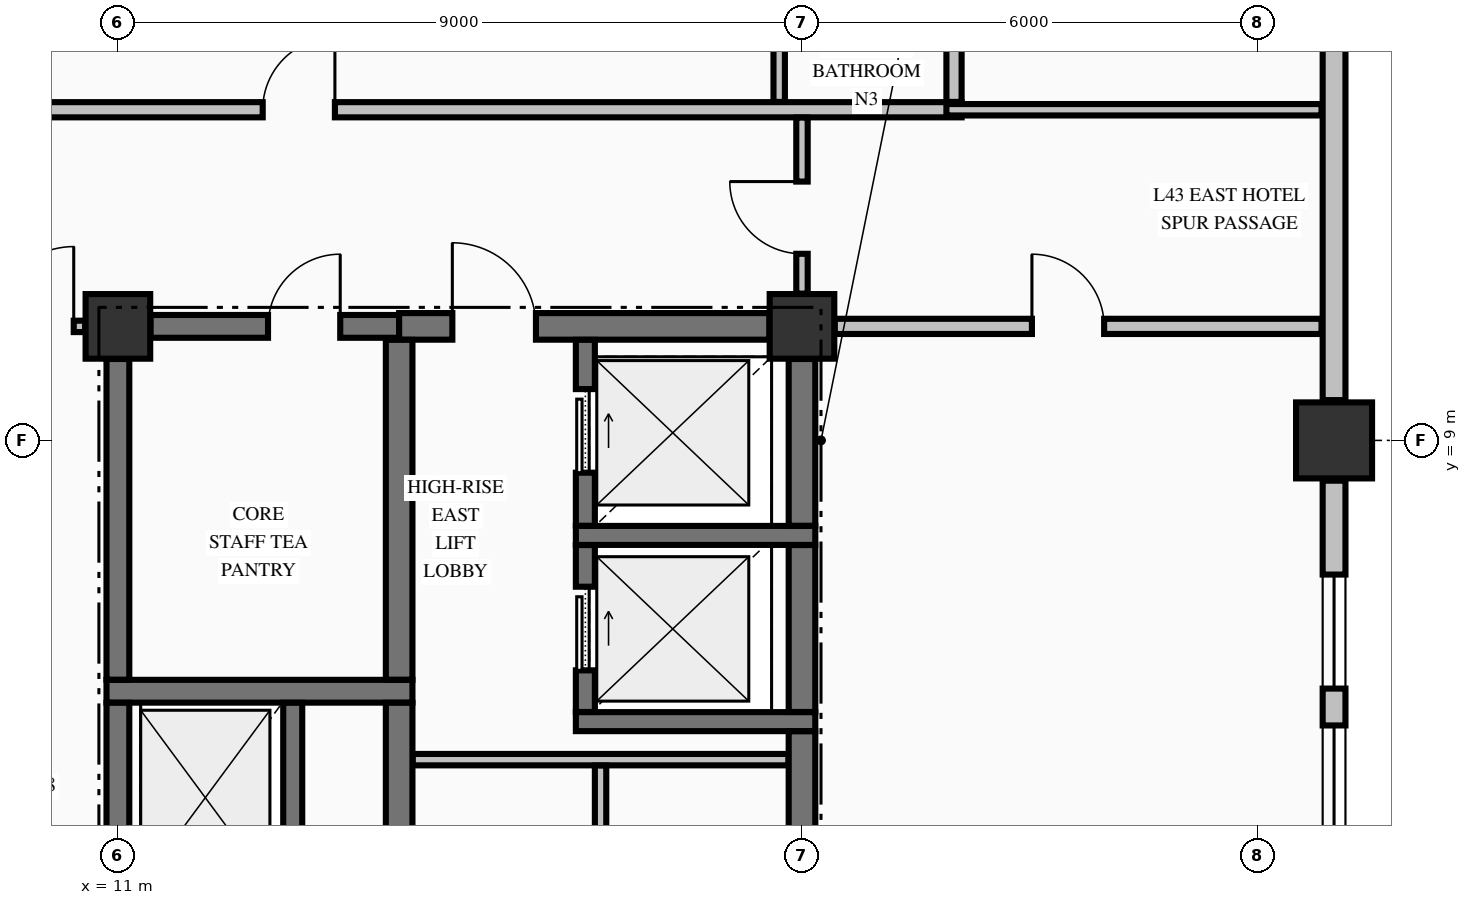
"""IFC4 building model, lengths in metres.
Left out: names, types, materials, properties, quantities, classifications, styles, units other than length and angle.
Written with IfcOpenShell. Run it as: python <this file> out.ifc"""

import sys

from ifc_helpers import new_model, si_unit, direction, frame, frame_2d, origin, origin_2d, place, context, subcontext, project, spatial, rectangle, extrude, element, fill, save


model = new_model("IFC4")
c1 = context("Model", 3, precision=1e-05, world=origin(), true_north=direction((0.0, 1.0)))
c2 = subcontext(c1, "Body", "Model", "MODEL_VIEW")
j1 = project(units=[si_unit("LENGTHUNIT", "METRE"), si_unit("PLANEANGLEUNIT", "RADIAN")], contexts=[c1])
p1 = place(None, origin())
s1 = spatial("IfcSite", under=j1, at=p1, CompositionType="ELEMENT")
p2 = place(p1, origin())
s2 = spatial("IfcBuilding", under=s1, at=p2, CompositionType="ELEMENT")
p3 = place(p2, frame((0.0, 0.0, 169.46)))
s3 = spatial("IfcBuildingStorey", under=s2, at=p3, CompositionType="ELEMENT", Elevation=169.46)
p4 = place(p3, frame((27.0, 9.0, -0.25), z_axis=(0.0, 0.0, 1.0), x_axis=(1.0, 0.0, 0.0)))
e1 = element("IfcColumn", 1, at=p4, inside=s3, PredefinedType="COLUMN", context=c2, shape_type="SweptSolid", body=[
    extrude(rectangle(XDim=1.0, YDim=1.0, at=origin_2d()), origin(), (0.0, 0.0, 1.0), 3.4),
])
for number, where, z_axis, x_axis in (
    (2, (11.0, 10.5, -0.25), (0.0, 0.0, 1.0), (1.0, 0.0, 0.0)),
    (3, (20.0, 10.5, -0.25), (0.0, 0.0, 1.0), (1.0, 0.0, 0.0)),
):
    element("IfcColumn", number, at=place(p3, frame(where, z_axis=z_axis, x_axis=x_axis)), inside=s3, PredefinedType="COLUMN", context=c2, shape_type="SweptSolid", body=[
        extrude(rectangle(XDim=0.85, YDim=0.85, at=origin_2d()), origin(), (0.0, 0.0, 1.0), 3.4),
    ])
p5 = place(p3, frame((27.0, 0.53, 0.0), z_axis=(0.0, 0.0, 1.0), x_axis=(0.0, 1.0, 0.0)))
e4 = element("IfcWall", 4, at=p5, inside=s3, PredefinedType="STANDARD", context=c2, shape_type="SweptSolid", body=[
    extrude(rectangle(XDim=7.94, YDim=0.3, at=frame_2d((3.97, 0.0))), origin(), (0.0, 0.0, 1.0), 2.542),
])
p6 = place(p5, frame((1.235, 0.0, 0.72)))
e5 = element("IfcOpeningElement", 5, at=p6, cuts=e4, PredefinedType="OPENING", context=c2, shape_type="SweptSolid", body=[
    extrude(rectangle(XDim=1.5, YDim=1.6, at=frame_2d((0.75, 0.8))), frame((0.0, 0.16, 0.0), z_axis=(0.0, -1.0, 0.0), x_axis=(1.0, 0.0, 0.0)), (0.0, 0.0, 1.0), 0.32),
])
p7 = place(p5, frame((3.22, 0.0, 0.72)))
e6 = element("IfcOpeningElement", 6, at=p7, cuts=e4, PredefinedType="OPENING", context=c2, shape_type="SweptSolid", body=[
    extrude(rectangle(XDim=1.5, YDim=1.6, at=frame_2d((0.75, 0.8))), frame((0.0, 0.16, 0.0), z_axis=(0.0, -1.0, 0.0), x_axis=(1.0, 0.0, 0.0)), (0.0, 0.0, 1.0), 0.32),
])
p8 = place(p5, frame((5.205, 0.0, 0.72)))
e7 = element("IfcOpeningElement", 7, at=p8, cuts=e4, PredefinedType="OPENING", context=c2, shape_type="SweptSolid", body=[
    extrude(rectangle(XDim=1.5, YDim=1.6, at=frame_2d((0.75, 0.8))), frame((0.0, 0.16, 0.0), z_axis=(0.0, -1.0, 0.0), x_axis=(1.0, 0.0, 0.0)), (0.0, 0.0, 1.0), 0.32),
])
p9 = place(p3, frame((27.0, 9.53, 0.0), z_axis=(0.0, 0.0, 1.0), x_axis=(0.0, 1.0, 0.0)))
e8 = element("IfcWall", 8, at=p9, inside=s3, PredefinedType="STANDARD", context=c2, shape_type="SweptSolid", body=[
    extrude(rectangle(XDim=9.44, YDim=0.3, at=frame_2d((4.72, 0.0))), origin(), (0.0, 0.0, 1.0), 2.542),
])
p10 = place(p3, frame((17.025, 5.3, 0.0), z_axis=(0.0, 0.0, 1.0), x_axis=(1.0, 0.0, 0.0)))
e9 = element("IfcWall", 9, at=p10, inside=s3, PredefinedType="SOLIDWALL", context=c2, shape_type="SweptSolid", body=[
    extrude(rectangle(XDim=3.15, YDim=0.25, at=frame_2d((1.575, 0.0))), origin(), (0.0, 0.0, 1.0), 3.15),
])
p11 = place(p3, frame((10.85, 5.7, 0.0), z_axis=(0.0, 0.0, 1.0), x_axis=(1.0, 0.0, 0.0)))
e10 = element("IfcWall", 10, at=p11, inside=s3, PredefinedType="SHEAR", context=c2, shape_type="SweptSolid", body=[
    extrude(rectangle(XDim=4.025, YDim=0.3, at=frame_2d((2.012, 0.0))), origin(), (0.0, 0.0, 1.0), 3.15),
])
p12 = place(p3, frame((17.025, 7.75, 0.0), z_axis=(0.0, 0.0, 1.0), x_axis=(1.0, 0.0, 0.0)))
e11 = element("IfcWall", 11, at=p12, inside=s3, PredefinedType="SOLIDWALL", context=c2, shape_type="SweptSolid", body=[
    extrude(rectangle(XDim=3.15, YDim=0.25, at=frame_2d((1.575, 0.0))), origin(), (0.0, 0.0, 1.0), 3.15),
])
p13 = place(p3, frame((11.429, 10.5, 0.0), z_axis=(0.0, 0.0, 1.0), x_axis=(1.0, 0.0, 0.0)))
e12 = element("IfcWall", 12, at=p13, inside=s3, PredefinedType="SHEAR", context=c2, shape_type="SweptSolid", body=[
    extrude(rectangle(XDim=3.271, YDim=0.3, at=frame_2d((1.635, 0.0))), origin(), (0.0, 0.0, 1.0), 3.15),
])
p14 = place(p13, frame((1.546, 0.0, 0.0)))
e13 = element("IfcOpeningElement", 13, at=p14, cuts=e12, PredefinedType="OPENING", context=c2, shape_type="SweptSolid", body=[
    extrude(rectangle(XDim=0.95, YDim=2.15, at=frame_2d((0.475, 1.075))), frame((0.0, 0.16, 0.0), z_axis=(0.0, -1.0, 0.0), x_axis=(1.0, 0.0, 0.0)), (0.0, 0.0, 1.0), 0.32),
])
p15 = place(p3, frame((14.7, 10.5, 0.0), z_axis=(0.0, 0.0, 1.0), x_axis=(1.0, 0.0, 0.0)))
e14 = element("IfcWall", 14, at=p15, inside=s3, PredefinedType="SHEAR", context=c2, shape_type="SweptSolid", body=[
    extrude(rectangle(XDim=4.871, YDim=0.35, at=frame_2d((2.436, 0.0))), origin(), (0.0, 0.0, 1.0), 3.15),
])
p16 = place(p15, frame((0.7, 0.0, 0.0)))
e15 = element("IfcOpeningElement", 15, at=p16, cuts=e14, PredefinedType="OPENING", context=c2, shape_type="SweptSolid", body=[
    extrude(rectangle(XDim=1.1, YDim=2.15, at=frame_2d((0.55, 1.075))), frame((0.0, 0.185, 0.0), z_axis=(0.0, -1.0, 0.0), x_axis=(1.0, 0.0, 0.0)), (0.0, 0.0, 1.0), 0.37),
])
p17 = place(p3, frame((14.878, 4.8, 0.0), z_axis=(0.0, 0.0, 1.0), x_axis=(1.0, 0.0, 0.0)))
e16 = element("IfcWall", 16, at=p17, inside=s3, PredefinedType="PARTITIONING", context=c2, shape_type="SweptSolid", body=[
    extrude(rectangle(XDim=4.944, YDim=0.15, at=frame_2d((2.472, 0.0))), origin(), (0.0, 0.0, 1.0), 3.15),
])
p18 = place(p3, frame((-10.569, 10.5, 0.0), z_axis=(0.0, 0.0, 1.0), x_axis=(1.0, 0.0, 0.0)))
e17 = element("IfcWall", 17, at=p18, inside=s3, PredefinedType="PARTITIONING", context=c2, shape_type="SweptSolid", body=[
    extrude(rectangle(XDim=21.138, YDim=0.15, at=frame_2d((10.569, 0.0))), origin(), (0.0, 0.0, 1.0), 3.15),
])
p19 = place(p18, frame((0.15, 0.0, 0.0)))
e18 = element("IfcOpeningElement", 18, at=p19, cuts=e17, PredefinedType="OPENING", context=c2, shape_type="SweptSolid", body=[
    extrude(rectangle(XDim=1.05, YDim=2.15, at=frame_2d((0.525, 1.075))), frame((0.0, 0.085, 0.0), z_axis=(0.0, -1.0, 0.0), x_axis=(1.0, 0.0, 0.0)), (0.0, 0.0, 1.0), 0.17),
])
p20 = place(p18, frame((19.938, 0.0, 0.0)))
e19 = element("IfcOpeningElement", 19, at=p20, cuts=e17, PredefinedType="OPENING", context=c2, shape_type="SweptSolid", body=[
    extrude(rectangle(XDim=1.05, YDim=2.15, at=frame_2d((0.525, 1.075))), frame((0.0, 0.085, 0.0), z_axis=(0.0, -1.0, 0.0), x_axis=(1.0, 0.0, 0.0)), (0.0, 0.0, 1.0), 0.17),
])
p21 = place(p3, frame((20.431, 10.5, 0.0), z_axis=(0.0, 0.0, 1.0), x_axis=(1.0, 0.0, 0.0)))
e20 = element("IfcWall", 20, at=p21, inside=s3, PredefinedType="PARTITIONING", context=c2, shape_type="SweptSolid", body=[
    extrude(rectangle(XDim=6.404, YDim=0.2, at=frame_2d((3.202, 0.0))), origin(), (0.0, 0.0, 1.0), 3.15),
])
p22 = place(p21, frame((2.594, 0.0, 0.0)))
e21 = element("IfcOpeningElement", 21, at=p22, cuts=e20, PredefinedType="OPENING", context=c2, shape_type="SweptSolid", body=[
    extrude(rectangle(XDim=0.95, YDim=2.15, at=frame_2d((0.475, 1.075))), frame((0.0, 0.11, 0.0), z_axis=(0.0, -1.0, 0.0), x_axis=(1.0, 0.0, 0.0)), (0.0, 0.0, 1.0), 0.22),
])
p23 = place(p3, frame((-17.1, 13.35, 0.0), z_axis=(0.0, 0.0, 1.0), x_axis=(1.0, 0.0, 0.0)))
e22 = element("IfcWall", 22, at=p23, inside=s3, PredefinedType="PARTITIONING", context=c2, shape_type="SweptSolid", body=[
    extrude(rectangle(XDim=39.2, YDim=0.2, at=frame_2d((19.6, 0.0))), origin(), (0.0, 0.0, 1.0), 3.15),
])
p24 = place(p23, frame((3.695, 0.0, 0.0)))
e23 = element("IfcOpeningElement", 23, at=p24, cuts=e22, PredefinedType="OPENING", context=c2, shape_type="SweptSolid", body=[
    extrude(rectangle(XDim=0.95, YDim=2.15, at=frame_2d((0.475, 1.075))), frame((0.0, 0.11, 0.0), z_axis=(0.0, -1.0, 0.0), x_axis=(1.0, 0.0, 0.0)), (0.0, 0.0, 1.0), 0.22),
])
p25 = place(p23, frame((19.725, 0.0, 0.0)))
e24 = element("IfcOpeningElement", 24, at=p25, cuts=e22, PredefinedType="OPENING", context=c2, shape_type="SweptSolid", body=[
    extrude(rectangle(XDim=0.95, YDim=2.15, at=frame_2d((0.475, 1.075))), frame((0.0, 0.11, 0.0), z_axis=(0.0, -1.0, 0.0), x_axis=(1.0, 0.0, 0.0)), (0.0, 0.0, 1.0), 0.22),
])
p26 = place(p23, frame((30.005, 0.0, 0.0)))
e25 = element("IfcOpeningElement", 25, at=p26, cuts=e22, PredefinedType="OPENING", context=c2, shape_type="SweptSolid", body=[
    extrude(rectangle(XDim=0.95, YDim=2.15, at=frame_2d((0.475, 1.075))), frame((0.0, 0.11, 0.0), z_axis=(0.0, -1.0, 0.0), x_axis=(1.0, 0.0, 0.0)), (0.0, 0.0, 1.0), 0.22),
])
p27 = place(p3, frame((21.9, 13.35, 0.0), z_axis=(0.0, 0.0, 1.0), x_axis=(1.0, 0.0, 0.0)))
e26 = element("IfcWall", 26, at=p27, inside=s3, PredefinedType="PARTITIONING", context=c2, shape_type="SweptSolid", body=[
    extrude(rectangle(XDim=4.935, YDim=0.15, at=frame_2d((2.468, 0.0))), origin(), (0.0, 0.0, 1.0), 3.15),
])
p28 = place(p3, frame((11.0, 3.052, 0.0), z_axis=(0.0, 0.0, 1.0), x_axis=(0.0, 1.0, 0.0)))
e27 = element("IfcWall", 27, at=p28, inside=s3, PredefinedType="SHEAR", context=c2, shape_type="SweptSolid", body=[
    extrude(rectangle(XDim=2.496, YDim=0.3, at=frame_2d((1.248, 0.0))), origin(), (0.0, 0.0, 1.0), 3.15),
])
p29 = place(p3, frame((11.0, 5.852, 0.0), z_axis=(0.0, 0.0, 1.0), x_axis=(0.0, 1.0, 0.0)))
e28 = element("IfcWall", 28, at=p29, inside=s3, PredefinedType="SHEAR", context=c2, shape_type="SweptSolid", body=[
    extrude(rectangle(XDim=4.219, YDim=0.3, at=frame_2d((2.109, 0.0))), origin(), (0.0, 0.0, 1.0), 3.15),
])
p30 = place(p3, frame((13.3, 3.052, 0.0), z_axis=(0.0, 0.0, 1.0), x_axis=(0.0, 1.0, 0.0)))
e29 = element("IfcWall", 29, at=p30, inside=s3, PredefinedType="SOLIDWALL", context=c2, shape_type="SweptSolid", body=[
    extrude(rectangle(XDim=2.496, YDim=0.25, at=frame_2d((1.248, 0.0))), origin(), (0.0, 0.0, 1.0), 3.15),
])
p31 = place(p3, frame((14.7, 3.052, 0.0), z_axis=(0.0, 0.0, 1.0), x_axis=(0.0, 1.0, 0.0)))
e30 = element("IfcWall", 30, at=p31, inside=s3, PredefinedType="SHEAR", context=c2, shape_type="SweptSolid", body=[
    extrude(rectangle(XDim=2.496, YDim=0.35, at=frame_2d((1.248, 0.0))), origin(), (0.0, 0.0, 1.0), 3.15),
])
p32 = place(p3, frame((14.7, 5.852, 0.0), z_axis=(0.0, 0.0, 1.0), x_axis=(0.0, 1.0, 0.0)))
e31 = element("IfcWall", 31, at=p32, inside=s3, PredefinedType="SHEAR", context=c2, shape_type="SweptSolid", body=[
    extrude(rectangle(XDim=4.471, YDim=0.35, at=frame_2d((2.235, 0.0))), origin(), (0.0, 0.0, 1.0), 3.15),
])
p33 = place(p3, frame((17.15, 5.427, 0.0), z_axis=(0.0, 0.0, 1.0), x_axis=(0.0, 1.0, 0.0)))
e32 = element("IfcWall", 32, at=p33, inside=s3, PredefinedType="SOLIDWALL", context=c2, shape_type="SweptSolid", body=[
    extrude(rectangle(XDim=2.196, YDim=0.25, at=frame_2d((1.098, 0.0))), origin(), (0.0, 0.0, 1.0), 3.15),
])
p34 = place(p33, frame((0.548, 0.0, 0.0)))
e33 = element("IfcOpeningElement", 33, at=p34, cuts=e32, PredefinedType="OPENING", context=c2, shape_type="SweptSolid", body=[
    extrude(rectangle(XDim=1.1, YDim=2.2, at=frame_2d((0.55, 1.1))), frame((0.0, 0.135, 0.0), z_axis=(0.0, -1.0, 0.0), x_axis=(1.0, 0.0, 0.0)), (0.0, 0.0, 1.0), 0.27),
])
p35 = place(p3, frame((17.15, 7.877, 0.0), z_axis=(0.0, 0.0, 1.0), x_axis=(0.0, 1.0, 0.0)))
e34 = element("IfcWall", 34, at=p35, inside=s3, PredefinedType="SOLIDWALL", context=c2, shape_type="SweptSolid", body=[
    extrude(rectangle(XDim=2.446, YDim=0.25, at=frame_2d((1.223, 0.0))), origin(), (0.0, 0.0, 1.0), 3.15),
])
p36 = place(p35, frame((0.698, 0.0, 0.0)))
e35 = element("IfcOpeningElement", 35, at=p36, cuts=e34, PredefinedType="OPENING", context=c2, shape_type="SweptSolid", body=[
    extrude(rectangle(XDim=1.1, YDim=2.2, at=frame_2d((0.55, 1.1))), frame((0.0, 0.135, 0.0), z_axis=(0.0, -1.0, 0.0), x_axis=(1.0, 0.0, 0.0)), (0.0, 0.0, 1.0), 0.27),
])
p37 = place(p3, frame((20.0, 0.429, 0.0), z_axis=(0.0, 0.0, 1.0), x_axis=(0.0, 1.0, 0.0)))
e36 = element("IfcWall", 36, at=p37, inside=s3, PredefinedType="SHEAR", context=c2, shape_type="SweptSolid", body=[
    extrude(rectangle(XDim=4.744, YDim=0.35, at=frame_2d((2.372, 0.0))), origin(), (0.0, 0.0, 1.0), 3.15),
])
p38 = place(p3, frame((20.0, 5.427, 0.0), z_axis=(0.0, 0.0, 1.0), x_axis=(0.0, 1.0, 0.0)))
e37 = element("IfcWall", 37, at=p38, inside=s3, PredefinedType="SHEAR", context=c2, shape_type="SweptSolid", body=[
    extrude(rectangle(XDim=2.196, YDim=0.35, at=frame_2d((1.098, 0.0))), origin(), (0.0, 0.0, 1.0), 3.15),
])
p39 = place(p3, frame((20.0, 7.877, 0.0), z_axis=(0.0, 0.0, 1.0), x_axis=(0.0, 1.0, 0.0)))
e38 = element("IfcWall", 38, at=p39, inside=s3, PredefinedType="SHEAR", context=c2, shape_type="SweptSolid", body=[
    extrude(rectangle(XDim=2.194, YDim=0.35, at=frame_2d((1.097, 0.0))), origin(), (0.0, 0.0, 1.0), 3.15),
])
p40 = place(p3, frame((17.35, -9.772, 0.0), z_axis=(0.0, 0.0, 1.0), x_axis=(0.0, 1.0, 0.0)))
e39 = element("IfcWall", 39, at=p40, inside=s3, PredefinedType="PARTITIONING", context=c2, shape_type="SweptSolid", body=[
    extrude(rectangle(XDim=14.494, YDim=0.15, at=frame_2d((7.247, 0.0))), origin(), (0.0, 0.0, 1.0), 3.15),
])
p41 = place(p3, frame((19.7, 13.453, 0.0), z_axis=(0.0, 0.0, 1.0), x_axis=(0.0, 1.0, 0.0)))
e40 = element("IfcWall", 40, at=p41, inside=s3, PredefinedType="PARTITIONING", context=c2, shape_type="SweptSolid", body=[
    extrude(rectangle(XDim=2.069, YDim=0.15, at=frame_2d((1.035, 0.0))), origin(), (0.0, 0.0, 1.0), 2.342),
])
p42 = place(p3, frame((20.0, 10.931, 0.0), z_axis=(0.0, 0.0, 1.0), x_axis=(0.0, 1.0, 0.0)))
e41 = element("IfcWall", 41, at=p42, inside=s3, PredefinedType="PARTITIONING", context=c2, shape_type="SweptSolid", body=[
    extrude(rectangle(XDim=2.316, YDim=0.15, at=frame_2d((1.158, 0.0))), origin(), (0.0, 0.0, 1.0), 2.342),
])
p43 = place(p42, frame((0.524, 0.0, 0.0)))
e42 = element("IfcOpeningElement", 42, at=p43, cuts=e41, PredefinedType="OPENING", context=c2, shape_type="SweptSolid", body=[
    extrude(rectangle(XDim=0.95, YDim=2.15, at=frame_2d((0.475, 1.075))), frame((0.0, 0.085, 0.0), z_axis=(0.0, -1.0, 0.0), x_axis=(1.0, 0.0, 0.0)), (0.0, 0.0, 1.0), 0.17),
])
p44 = place(p3, frame((22.0, 13.453, 0.0), z_axis=(0.0, 0.0, 1.0), x_axis=(0.0, 1.0, 0.0)))
e43 = element("IfcWall", 43, at=p44, inside=s3, PredefinedType="PARTITIONING", context=c2, shape_type="SweptSolid", body=[
    extrude(rectangle(XDim=2.069, YDim=0.2, at=frame_2d((1.035, 0.0))), origin(), (0.0, 0.0, 1.0), 3.15),
])
p45 = place(p7, origin())
e44 = element("IfcWindow", 44, at=p45, inside=s3, PartitioningType="SINGLE_PANEL", PredefinedType="WINDOW", context=c2, shape_type="SweptSolid", body=[
    extrude(rectangle(XDim=1.5, YDim=1.6, at=frame_2d((0.75, 0.8))), frame((0.0, 0.03, 0.0), z_axis=(0.0, -1.0, 0.0), x_axis=(1.0, 0.0, 0.0)), (0.0, 0.0, 1.0), 0.06),
])
fill(e6, e44)
p46 = place(p8, origin())
e45 = element("IfcWindow", 45, at=p46, inside=s3, PartitioningType="SINGLE_PANEL", PredefinedType="WINDOW", context=c2, shape_type="SweptSolid", body=[
    extrude(rectangle(XDim=1.5, YDim=1.6, at=frame_2d((0.75, 0.8))), frame((0.0, 0.03, 0.0), z_axis=(0.0, -1.0, 0.0), x_axis=(1.0, 0.0, 0.0)), (0.0, 0.0, 1.0), 0.06),
])
fill(e7, e45)
p47 = place(p14, origin())
e46 = element("IfcDoor", 46, at=p47, inside=s3, OperationType="SINGLE_SWING_RIGHT", PredefinedType="DOOR", context=c2, shape_type="SweptSolid", body=[
    extrude(rectangle(XDim=0.95, YDim=2.15, at=frame_2d((0.475, 1.075))), frame((0.0, 0.025, 0.0), z_axis=(0.0, -1.0, 0.0), x_axis=(1.0, 0.0, 0.0)), (0.0, 0.0, 1.0), 0.05),
])
fill(e13, e46)
p48 = place(p34, origin())
e47 = element("IfcDoor", 47, at=p48, inside=s3, OperationType="SLIDING_TO_RIGHT", PredefinedType="DOOR", context=c2, shape_type="SweptSolid", body=[
    extrude(rectangle(XDim=1.1, YDim=2.2, at=frame_2d((0.55, 1.1))), frame((0.0, 0.025, 0.0), z_axis=(0.0, -1.0, 0.0), x_axis=(1.0, 0.0, 0.0)), (0.0, 0.0, 1.0), 0.05),
])
fill(e33, e47)
p49 = place(p36, origin())
e48 = element("IfcDoor", 48, at=p49, inside=s3, OperationType="SLIDING_TO_RIGHT", PredefinedType="DOOR", context=c2, shape_type="SweptSolid", body=[
    extrude(rectangle(XDim=1.1, YDim=2.2, at=frame_2d((0.55, 1.1))), frame((0.0, 0.025, 0.0), z_axis=(0.0, -1.0, 0.0), x_axis=(1.0, 0.0, 0.0)), (0.0, 0.0, 1.0), 0.05),
])
fill(e35, e48)
p50 = place(p16, origin())
e49 = element("IfcDoor", 49, at=p50, inside=s3, OperationType="SINGLE_SWING_LEFT", PredefinedType="DOOR", context=c2, shape_type="SweptSolid", body=[
    extrude(rectangle(XDim=1.1, YDim=2.15, at=frame_2d((0.55, 1.075))), frame((0.0, 0.025, 0.0), z_axis=(0.0, -1.0, 0.0), x_axis=(1.0, 0.0, 0.0)), (0.0, 0.0, 1.0), 0.05),
])
fill(e15, e49)
p51 = place(p20, origin())
e50 = element("IfcDoor", 50, at=p51, inside=s3, OperationType="SINGLE_SWING_RIGHT", PredefinedType="DOOR", context=c2, shape_type="SweptSolid", body=[
    extrude(rectangle(XDim=1.05, YDim=2.15, at=frame_2d((0.525, 1.075))), frame((0.0, 0.025, 0.0), z_axis=(0.0, -1.0, 0.0), x_axis=(1.0, 0.0, 0.0)), (0.0, 0.0, 1.0), 0.05),
])
fill(e19, e50)
p52 = place(p26, origin())
e51 = element("IfcDoor", 51, at=p52, inside=s3, OperationType="SINGLE_SWING_RIGHT", PredefinedType="DOOR", context=c2, shape_type="SweptSolid", body=[
    extrude(rectangle(XDim=0.95, YDim=2.15, at=frame_2d((0.475, 1.075))), frame((0.0, 0.025, 0.0), z_axis=(0.0, -1.0, 0.0), x_axis=(1.0, 0.0, 0.0)), (0.0, 0.0, 1.0), 0.05),
])
fill(e25, e51)
p53 = place(p43, origin())
e52 = element("IfcDoor", 52, at=p53, inside=s3, OperationType="SINGLE_SWING_RIGHT", PredefinedType="DOOR", context=c2, shape_type="SweptSolid", body=[
    extrude(rectangle(XDim=0.95, YDim=2.15, at=frame_2d((0.475, 1.075))), frame((0.0, 0.025, 0.0), z_axis=(0.0, -1.0, 0.0), x_axis=(1.0, 0.0, 0.0)), (0.0, 0.0, 1.0), 0.05),
])
fill(e42, e52)
p54 = place(p22, origin())
e53 = element("IfcDoor", 53, at=p54, inside=s3, OperationType="SINGLE_SWING_LEFT", PredefinedType="DOOR", context=c2, shape_type="SweptSolid", body=[
    extrude(rectangle(XDim=0.95, YDim=2.15, at=frame_2d((0.475, 1.075))), frame((0.0, 0.025, 0.0), z_axis=(0.0, -1.0, 0.0), x_axis=(1.0, 0.0, 0.0)), (0.0, 0.0, 1.0), 0.05),
])
fill(e21, e53)
save(model, sys.argv[1])
